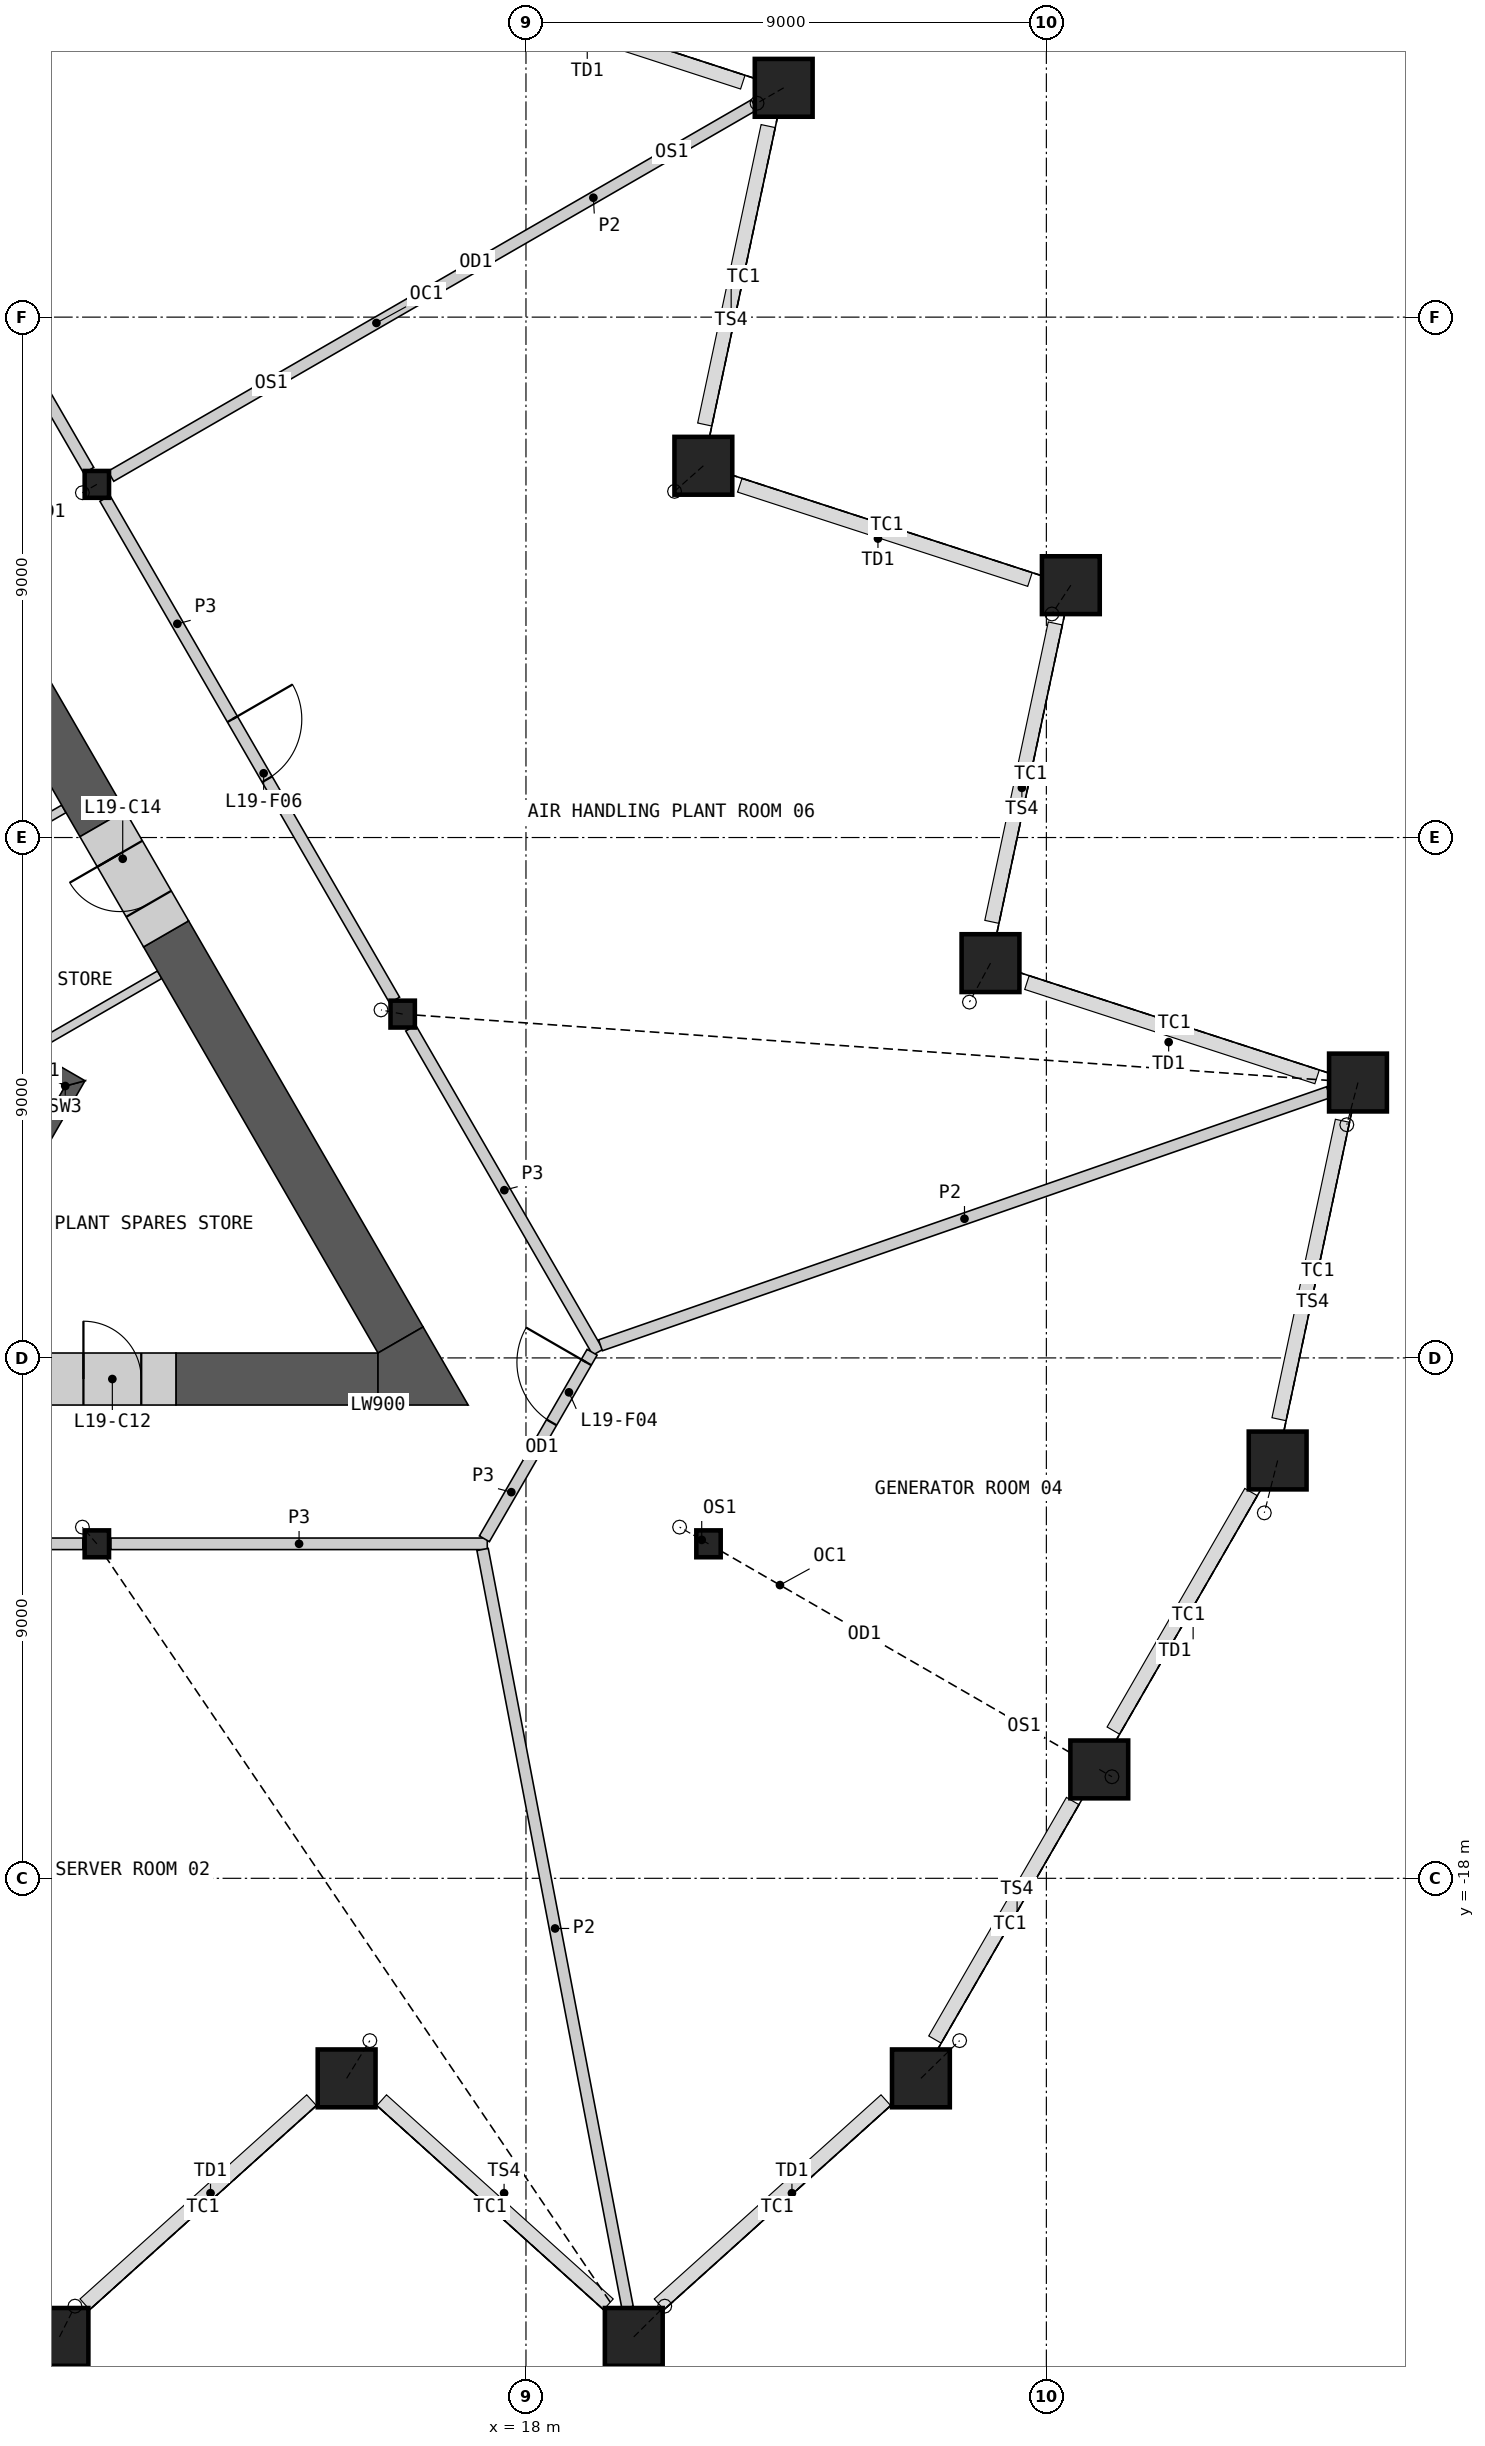
"""IFC4 building model, lengths in metres.
Left out: names, types, materials, properties, quantities, classifications, styles, units other than length and angle.
Written with IfcOpenShell. Run it as: python <this file> out.ifc"""

import sys

from ifc_helpers import new_model, si_unit, direction, frame, frame_2d, origin, origin_2d, place, context, subcontext, project, spatial, polyline, rectangle, hollow_rectangle, i_section, outline, extrude, element, fill, save


model = new_model("IFC4")
c1 = context("Model", 3, precision=1e-05, world=origin(), true_north=direction((0.0, 1.0)))
c2 = subcontext(c1, "Body", "Model", "MODEL_VIEW")
j1 = project(units=[si_unit("LENGTHUNIT", "METRE"), si_unit("PLANEANGLEUNIT", "RADIAN")], contexts=[c1])
p1 = place(None, origin())
s1 = spatial("IfcSite", under=j1, at=p1, CompositionType="ELEMENT")
p2 = place(p1, origin())
s2 = spatial("IfcBuilding", under=s1, at=p2, CompositionType="ELEMENT")
p3 = place(p2, frame((0.0, 0.0, 94.6)))
s3 = spatial("IfcBuildingStorey", under=s2, at=p3, CompositionType="ELEMENT", Elevation=94.6)
p4 = place(p3, frame((9.932, -25.931, 0.0), z_axis=(0.053188154863, 0.105697518324, 0.992974851042), x_axis=(-0.893276919367, 0.449506780067, 0.0)))
e1 = element("IfcColumn", 1, at=p4, inside=s3, PredefinedType="COLUMN", context=c2, shape_type="SweptSolid", body=[
    extrude(hollow_rectangle(XDim=1.0, YDim=1.0, WallThickness=0.07, at=origin_2d()), frame((0.0, 0.0, 0.06)), (0.0, 0.0, 1.0), 4.916),
])
p5 = place(p3, frame((14.898, -21.46, 0.0), z_axis=(0.07939482303, 0.129058818712, 0.98845348064), x_axis=(-0.851734862895, 0.523973017749, 0.0)))
e2 = element("IfcColumn", 2, at=p5, inside=s3, PredefinedType="COLUMN", context=c2, shape_type="SweptSolid", body=[
    extrude(hollow_rectangle(XDim=1.0, YDim=1.0, WallThickness=0.07, at=origin_2d()), frame((0.0, 0.0, 0.077)), (0.0, 0.0, 1.0), 4.905),
])
p6 = place(p3, frame((19.864, -25.931, 0.0), z_axis=(0.105880018908, 0.105252367177, 0.988792880638), x_axis=(-0.705001587737, 0.709205725645, 0.0)))
e3 = element("IfcColumn", 3, at=p6, inside=s3, PredefinedType="COLUMN", context=c2, shape_type="SweptSolid", body=[
    extrude(hollow_rectangle(XDim=1.0, YDim=1.0, WallThickness=0.07, at=origin_2d()), frame((0.0, 0.0, 0.075)), (0.0, 0.0, 1.0), 4.906),
])
p7 = place(p3, frame((24.83, -21.46, 0.0), z_axis=(0.131605166119, 0.128341434793, 0.982959081735), x_axis=(-0.698173751627, 0.715928357128, 0.0)))
e4 = element("IfcColumn", 4, at=p7, inside=s3, PredefinedType="COLUMN", context=c2, shape_type="SweptSolid", body=[
    extrude(hollow_rectangle(XDim=1.0, YDim=1.0, WallThickness=0.07, at=origin_2d()), frame((0.0, 0.0, 0.094)), (0.0, 0.0, 1.0), 4.9),
])
p8 = place(p3, frame((27.915, -16.117, 0.0), z_axis=(0.04379158743, -0.025260626157, 0.998721281257), x_axis=(0.499666781426, 0.866217702163, 0.0)))
e5 = element("IfcColumn", 5, at=p8, inside=s3, PredefinedType="COLUMN", context=c2, shape_type="SweptSolid", body=[
    extrude(hollow_rectangle(XDim=1.0, YDim=1.0, WallThickness=0.07, at=origin_2d()), frame((0.0, 0.0, 0.025)), (0.0, 0.0, 1.0), 4.956),
])
p9 = place(p3, frame((31.0, -10.774, 0.0), z_axis=(-0.045356102759, -0.178160691472, 0.982955539156), x_axis=(0.9690892303, -0.246710485623, 0.0)))
e6 = element("IfcColumn", 6, at=p9, inside=s3, PredefinedType="COLUMN", context=c2, shape_type="SweptSolid", body=[
    extrude(hollow_rectangle(XDim=1.0, YDim=1.0, WallThickness=0.07, at=origin_2d()), frame((0.0, 0.0, 0.094)), (0.0, 0.0, 1.0), 4.9),
])
p10 = place(p3, frame((32.389, -4.237, 0.0), z_axis=(-0.038190275992, -0.144311927862, 0.988795009239), x_axis=(0.966721697861, -0.255830332221, 0.0)))
e7 = element("IfcColumn", 7, at=p10, inside=s3, PredefinedType="COLUMN", context=c2, shape_type="SweptSolid", body=[
    extrude(hollow_rectangle(XDim=1.0, YDim=1.0, WallThickness=0.07, at=origin_2d()), frame((0.0, 0.0, 0.075)), (0.0, 0.0, 1.0), 4.906),
])
p11 = place(p3, frame((26.034, -2.172, 0.0), z_axis=(-0.072058991564, -0.133258456603, 0.988458236588), x_axis=(0.879630861752, -0.475656963635, 0.0)))
e8 = element("IfcColumn", 8, at=p11, inside=s3, PredefinedType="COLUMN", context=c2, shape_type="SweptSolid", body=[
    extrude(hollow_rectangle(XDim=1.0, YDim=1.0, WallThickness=0.07, at=origin_2d()), frame((0.0, 0.0, 0.077)), (0.0, 0.0, 1.0), 4.905),
])
p12 = place(p3, frame((27.423, 4.364, 0.0), z_axis=(-0.064969927974, -0.098909442588, 0.992973227547), x_axis=(0.835812913886, -0.549014365004, 0.0)))
e9 = element("IfcColumn", 9, at=p12, inside=s3, PredefinedType="COLUMN", context=c2, shape_type="SweptSolid", body=[
    extrude(hollow_rectangle(XDim=1.0, YDim=1.0, WallThickness=0.07, at=origin_2d()), frame((0.0, 0.0, 0.06)), (0.0, 0.0, 1.0), 4.916),
])
p13 = place(p3, frame((21.068, 6.429, 0.0), z_axis=(-0.098784861039, -0.08770120931, 0.991236626197), x_axis=(0.663908879859, -0.747813478914, 0.0)))
e10 = element("IfcColumn", 10, at=p13, inside=s3, PredefinedType="COLUMN", context=c2, shape_type="SweptSolid", body=[
    extrude(hollow_rectangle(XDim=1.0, YDim=1.0, WallThickness=0.07, at=origin_2d()), frame((0.0, 0.0, 0.067)), (0.0, 0.0, 1.0), 4.911),
])
p14 = place(p3, frame((22.457, 12.966, 0.0), z_axis=(-0.091669600312, -0.05292365696, 0.994382105085), x_axis=(0.499987164874, -0.866032814021, 0.0)))
e11 = element("IfcColumn", 11, at=p14, inside=s3, PredefinedType="COLUMN", context=c2, shape_type="SweptSolid", body=[
    extrude(hollow_rectangle(XDim=1.0, YDim=1.0, WallThickness=0.07, at=origin_2d()), frame((0.0, 0.0, 0.053)), (0.0, 0.0, 1.0), 4.922),
])
p15 = place(p3, frame((10.578, -12.215, 0.0), z_axis=(-0.049854859349, 0.057547308351, 0.997097186989), x_axis=(-0.755815657913, -0.654784461677, 0.0)))
e12 = element("IfcColumn", 12, at=p15, inside=s3, PredefinedType="COLUMN", context=c2, shape_type="SweptSolid", body=[
    extrude(i_section(OverallWidth=0.421, OverallDepth=0.465, WebThickness=0.045, FlangeThickness=0.072, at=origin_2d()), frame((0.0, 0.0, 0.018)), (0.0, 0.0, 1.0), 4.979),
])
p16 = place(p3, frame((21.157, -12.215, 0.0), z_axis=(-0.099340040995, 0.057333949442, 0.993400409954), x_axis=(-0.499868889286, -0.866101087359, 0.0)))
e13 = element("IfcColumn", 13, at=p16, inside=s3, PredefinedType="COLUMN", context=c2, shape_type="SweptSolid", body=[
    extrude(i_section(OverallWidth=0.421, OverallDepth=0.465, WebThickness=0.045, FlangeThickness=0.072, at=origin_2d()), frame((0.0, 0.0, 0.027)), (0.0, 0.0, 1.0), 4.979),
])
p17 = place(p3, frame((15.868, -3.054, 0.0), z_axis=(-0.074782233985, 0.014362473324, 0.997096453128), x_axis=(-0.188610251533, -0.982052021543, 0.0)))
e14 = element("IfcColumn", 14, at=p17, inside=s3, PredefinedType="COLUMN", context=c2, shape_type="SweptSolid", body=[
    extrude(i_section(OverallWidth=0.421, OverallDepth=0.465, WebThickness=0.045, FlangeThickness=0.072, at=origin_2d()), frame((0.0, 0.0, 0.018)), (0.0, 0.0, 1.0), 4.979),
])
p18 = place(p3, frame((10.578, 6.107, 0.0), z_axis=(-0.049916888914, -0.028809454442, 0.998337778277), x_axis=(0.499868889286, -0.866101087359, 0.0)))
e15 = element("IfcColumn", 15, at=p18, inside=s3, PredefinedType="COLUMN", context=c2, shape_type="SweptSolid", body=[
    extrude(i_section(OverallWidth=0.421, OverallDepth=0.465, WebThickness=0.045, FlangeThickness=0.072, at=origin_2d()), frame((0.0, 0.0, 0.013)), (0.0, 0.0, 1.0), 4.981),
])
p19 = place(p3, origin())
e16 = element("IfcWall", 16, at=p19, inside=s3, PredefinedType="SHEAR", context=c2, shape_type="SweptSolid", body=[
    extrude(outline(polyline([(8.83, -6.881), (10.374, -4.206), (10.032, -4.298), (8.738, -6.539), (8.83, -6.881)])), origin(), (0.0, 0.0, 1.0), 4.6),
])
p20 = place(p3, origin())
e17 = element("IfcWall", 17, at=p20, inside=s3, PredefinedType="SHEAR", context=c2, shape_type="SweptSolid", body=[
    extrude(outline(polyline([(10.032, -4.298), (10.374, -4.206), (5.307, -1.281), (5.182, -1.498), (10.032, -4.298)])), origin(), (0.0, 0.0, 1.0), 4.6),
])
p21 = place(p3, frame((8.268, -0.509, 0.0), z_axis=(0.0, 0.0, 1.0), x_axis=(0.866035824272, 0.499981950752, 0.0)))
e18 = element("IfcWall", 18, at=p21, inside=s3, PredefinedType="PARTITIONING", context=c2, shape_type="SweptSolid", body=[
    extrude(rectangle(XDim=2.009, YDim=0.15, at=frame_2d((1.004, 0.0))), origin(), (0.0, 0.0, 1.0), 4.6),
])
p22 = place(p3, frame((11.664, -2.373, 0.0), z_axis=(0.0, 0.0, 1.0), x_axis=(-0.866034804124, -0.499983717781, 0.0)))
e19 = element("IfcWall", 19, at=p22, inside=s3, PredefinedType="PARTITIONING", context=c2, shape_type="SweptSolid", body=[
    extrude(rectangle(XDim=2.588, YDim=0.15, at=frame_2d((1.294, 0.0))), origin(), (0.0, 0.0, 1.0), 4.6),
])
p23 = place(p3, frame((11.946, -9.365, 0.0), z_axis=(0.0, 0.0, 1.0), x_axis=(1.0, 0.0, 0.0)))
e20 = element("IfcWall", 20, at=p23, inside=s3, PredefinedType="SHEAR", context=c2, shape_type="SweptSolid", body=[
    extrude(rectangle(XDim=3.495, YDim=0.9, at=frame_2d((1.748, 0.0))), origin(), (0.0, 0.0, 1.0), 4.6),
])
p24 = place(p3, frame((15.831, -8.69, 0.0), z_axis=(0.0, 0.0, 1.0), x_axis=(-0.499995201193, 0.866028174359, 0.0)))
e21 = element("IfcWall", 21, at=p24, inside=s3, PredefinedType="SHEAR", context=c2, shape_type="SweptSolid", body=[
    extrude(rectangle(XDim=8.11, YDim=0.9, at=frame_2d((4.055, 0.0))), origin(), (0.0, 0.0, 1.0), 4.6),
])
p25 = place(p3, frame((10.676, 0.239, 0.0), z_axis=(0.0, 0.0, 1.0), x_axis=(-0.499978737809, 0.866037679168, 0.0)))
e22 = element("IfcWall", 22, at=p25, inside=s3, PredefinedType="SHEAR", context=c2, shape_type="SweptSolid", body=[
    extrude(rectangle(XDim=2.831, YDim=0.9, at=frame_2d((1.416, 0.0))), origin(), (0.0, 0.0, 1.0), 4.6),
])
p26 = place(p3, origin())
e23 = element("IfcWall", 23, at=p26, inside=s3, PredefinedType="SHEAR", context=c2, shape_type="SweptSolid", body=[
    extrude(outline(polyline([(15.441, -9.815), (15.441, -8.915), (16.221, -8.465), (17.0, -9.815), (15.441, -9.815)])), origin(), (0.0, 0.0, 1.0), 4.6),
])
p27 = place(p3, frame((9.746, -9.365, 0.0), z_axis=(0.0, 0.0, 1.0), x_axis=(1.0, 0.0, 0.0)))
e24 = element("IfcWall", 24, at=p27, inside=s3, PredefinedType="SHEAR", context=c2, shape_type="SweptSolid", body=[
    extrude(rectangle(XDim=2.2, YDim=0.9, at=frame_2d((1.1, 0.0))), origin(), (0.0, 0.0, 1.0), 4.6),
])
p28 = place(p27, frame((0.6, 0.0, 0.0)))
e25 = element("IfcOpeningElement", 25, at=p28, cuts=e24, PredefinedType="OPENING", context=c2, shape_type="SweptSolid", body=[
    extrude(rectangle(XDim=1.0, YDim=2.1, at=frame_2d((0.5, 1.05))), frame((0.0, 0.46, 0.0), z_axis=(0.0, -1.0, 0.0), x_axis=(1.0, 0.0, 0.0)), (0.0, 0.0, 1.0), 0.92),
])
p29 = place(p3, frame((11.776, -1.667, 0.0), z_axis=(0.0, 0.0, 1.0), x_axis=(-0.50002983664, 0.866008176907, 0.0)))
e26 = element("IfcWall", 26, at=p29, inside=s3, PredefinedType="SHEAR", context=c2, shape_type="SweptSolid", body=[
    extrude(rectangle(XDim=2.2, YDim=0.9, at=frame_2d((1.1, 0.0))), origin(), (0.0, 0.0, 1.0), 4.6),
])
p30 = place(p29, frame((0.6, 0.0, 0.0)))
e27 = element("IfcOpeningElement", 27, at=p30, cuts=e26, PredefinedType="OPENING", context=c2, shape_type="SweptSolid", body=[
    extrude(rectangle(XDim=1.0, YDim=2.1, at=frame_2d((0.5, 1.05))), frame((0.0, 0.46, 0.0), z_axis=(0.0, -1.0, 0.0), x_axis=(1.0, 0.0, 0.0)), (0.0, 0.0, 1.0), 0.92),
])
p31 = place(p3, frame((0.242, -12.215, 0.0), z_axis=(0.0, 0.0, 1.0), x_axis=(1.0, 0.0, 0.0)))
e28 = element("IfcWall", 28, at=p31, inside=s3, PredefinedType="PARTITIONING", context=c2, shape_type="SweptSolid", body=[
    extrude(rectangle(XDim=10.094, YDim=0.2, at=frame_2d((5.047, 0.0))), origin(), (0.0, 0.0, 1.0), 4.6),
])
p32 = place(p31, frame((4.447, 0.0, 0.0)))
e29 = element("IfcOpeningElement", 29, at=p32, cuts=e28, PredefinedType="OPENING", context=c2, shape_type="SweptSolid", body=[
    extrude(rectangle(XDim=1.2, YDim=2.1, at=frame_2d((0.6, 1.05))), frame((0.0, 0.11, 0.0), z_axis=(0.0, -1.0, 0.0), x_axis=(1.0, 0.0, 0.0)), (0.0, 0.0, 1.0), 0.22),
])
p33 = place(p3, frame((5.429, 15.026, 0.0), z_axis=(0.0, 0.0, 1.0), x_axis=(0.50001002959, -0.86601961312, 0.0)))
e30 = element("IfcWall", 30, at=p33, inside=s3, PredefinedType="PARTITIONING", context=c2, shape_type="SweptSolid", body=[
    extrude(rectangle(XDim=10.019, YDim=0.2, at=frame_2d((5.009, 0.0))), origin(), (0.0, 0.0, 1.0), 4.6),
])
p34 = place(p33, frame((4.409, 0.0, 0.0)))
e31 = element("IfcOpeningElement", 31, at=p34, cuts=e30, PredefinedType="OPENING", context=c2, shape_type="SweptSolid", body=[
    extrude(rectangle(XDim=1.2, YDim=2.1, at=frame_2d((0.6, 1.05))), frame((0.0, 0.11, 0.0), z_axis=(0.0, -1.0, 0.0), x_axis=(1.0, 0.0, 0.0)), (0.0, 0.0, 1.0), 0.22),
])
p35 = place(p3, frame((10.719, 5.865, 0.0), z_axis=(0.0, 0.0, 1.0), x_axis=(0.49999175339, -0.866030164915, 0.0)))
e32 = element("IfcWall", 32, at=p35, inside=s3, PredefinedType="PARTITIONING", context=c2, shape_type="SweptSolid", body=[
    extrude(rectangle(XDim=10.019, YDim=0.2, at=frame_2d((5.009, 0.0))), origin(), (0.0, 0.0, 1.0), 4.6),
])
p36 = place(p35, frame((4.409, 0.0, 0.0)))
e33 = element("IfcOpeningElement", 33, at=p36, cuts=e32, PredefinedType="OPENING", context=c2, shape_type="SweptSolid", body=[
    extrude(rectangle(XDim=1.2, YDim=2.1, at=frame_2d((0.6, 1.05))), frame((0.0, 0.11, 0.0), z_axis=(0.0, -1.0, 0.0), x_axis=(1.0, 0.0, 0.0)), (0.0, 0.0, 1.0), 0.22),
])
p37 = place(p3, frame((10.821, -12.215, 0.0), z_axis=(0.0, 0.0, 1.0), x_axis=(1.0, 0.0, 0.0)))
e34 = element("IfcWall", 34, at=p37, inside=s3, PredefinedType="PARTITIONING", context=c2, shape_type="SweptSolid", body=[
    extrude(rectangle(XDim=6.51, YDim=0.2, at=frame_2d((3.255, 0.0))), origin(), (0.0, 0.0, 1.0), 4.6),
])
p38 = place(p3, frame((16.008, -3.296, 0.0), z_axis=(0.0, 0.0, 1.0), x_axis=(0.499984737558, -0.86603421538, 0.0)))
e35 = element("IfcWall", 35, at=p38, inside=s3, PredefinedType="PARTITIONING", context=c2, shape_type="SweptSolid", body=[
    extrude(rectangle(XDim=6.473, YDim=0.2, at=frame_2d((3.236, 0.0))), origin(), (0.0, 0.0, 1.0), 4.6),
])
p39 = place(p3, frame((17.281, -12.128, 0.0), z_axis=(0.0, 0.0, 1.0), x_axis=(0.499958791762, 0.866049194065, 0.0)))
e36 = element("IfcWall", 36, at=p39, inside=s3, PredefinedType="PARTITIONING", context=c2, shape_type="SweptSolid", body=[
    extrude(rectangle(XDim=3.726, YDim=0.2, at=frame_2d((1.863, 0.0))), origin(), (0.0, 0.0, 1.0), 4.6),
])
p40 = place(p39, frame((2.325, 0.0, 0.0)))
e37 = element("IfcOpeningElement", 37, at=p40, cuts=e36, PredefinedType="OPENING", context=c2, shape_type="SweptSolid", body=[
    extrude(rectangle(XDim=1.2, YDim=2.1, at=frame_2d((0.6, 1.05))), frame((0.0, 0.11, 0.0), z_axis=(0.0, -1.0, 0.0), x_axis=(1.0, 0.0, 0.0)), (0.0, 0.0, 1.0), 0.22),
])
p41 = place(p3, frame((17.25, -12.313, 0.0), z_axis=(0.0, 0.0, 1.0), x_axis=(0.187873651286, -0.982193204595, 0.0)))
e38 = element("IfcWall", 38, at=p41, inside=s3, PredefinedType="PARTITIONING", context=c2, shape_type="SweptSolid", body=[
    extrude(rectangle(XDim=13.346, YDim=0.2, at=frame_2d((6.673, 0.0))), origin(), (0.0, 0.0, 1.0), 4.6),
])
p42 = place(p3, frame((19.288, -8.782, 0.0), z_axis=(0.0, 0.0, 1.0), x_axis=(0.944544719933, 0.328382813263, 0.0)))
e39 = element("IfcWall", 39, at=p42, inside=s3, PredefinedType="PARTITIONING", context=c2, shape_type="SweptSolid", body=[
    extrude(rectangle(XDim=13.33, YDim=0.2, at=frame_2d((6.665, 0.0))), origin(), (0.0, 0.0, 1.0), 4.6),
])
p43 = place(p3, frame((10.821, 6.247, 0.0), z_axis=(0.0, 0.0, 1.0), x_axis=(0.866026729935, 0.499997703033, 0.0)))
e40 = element("IfcWall", 40, at=p43, inside=s3, PredefinedType="PARTITIONING", context=c2, shape_type="SweptSolid", body=[
    extrude(rectangle(XDim=12.848, YDim=0.2, at=frame_2d((6.424, 0.0))), origin(), (0.0, 0.0, 1.0), 4.6),
])
p44 = place(p28, origin())
e41 = element("IfcDoor", 41, at=p44, inside=s3, OperationType="SINGLE_SWING_LEFT", PredefinedType="DOOR", context=c2, shape_type="SweptSolid", body=[
    extrude(rectangle(XDim=1.0, YDim=2.1, at=frame_2d((0.5, 1.05))), frame((0.0, 0.205, 0.0), z_axis=(0.0, -1.0, 0.0), x_axis=(1.0, 0.0, 0.0)), (0.0, 0.0, 1.0), 0.05),
])
fill(e25, e41)
p45 = place(p30, origin())
e42 = element("IfcDoor", 42, at=p45, inside=s3, OperationType="SINGLE_SWING_RIGHT", PredefinedType="DOOR", context=c2, shape_type="SweptSolid", body=[
    extrude(rectangle(XDim=1.0, YDim=2.1, at=frame_2d((0.5, 1.05))), frame((0.0, 0.205, 0.0), z_axis=(0.0, -1.0, 0.0), x_axis=(1.0, 0.0, 0.0)), (0.0, 0.0, 1.0), 0.05),
])
fill(e27, e42)
p46 = place(p40, origin())
e43 = element("IfcDoor", 43, at=p46, inside=s3, OperationType="SINGLE_SWING_RIGHT", PredefinedType="DOOR", context=c2, shape_type="SweptSolid", body=[
    extrude(rectangle(XDim=1.2, YDim=2.1, at=frame_2d((0.6, 1.05))), frame((0.0, 0.025, 0.0), z_axis=(0.0, -1.0, 0.0), x_axis=(1.0, 0.0, 0.0)), (0.0, 0.0, 1.0), 0.05),
])
fill(e37, e43)
p47 = place(p36, origin())
e44 = element("IfcDoor", 44, at=p47, inside=s3, OperationType="SINGLE_SWING_LEFT", PredefinedType="DOOR", context=c2, shape_type="SweptSolid", body=[
    extrude(rectangle(XDim=1.2, YDim=2.1, at=frame_2d((0.6, 1.05))), frame((0.0, 0.025, 0.0), z_axis=(0.0, -1.0, 0.0), x_axis=(1.0, 0.0, 0.0)), (0.0, 0.0, 1.0), 0.05),
])
fill(e33, e44)
save(model, sys.argv[1])
